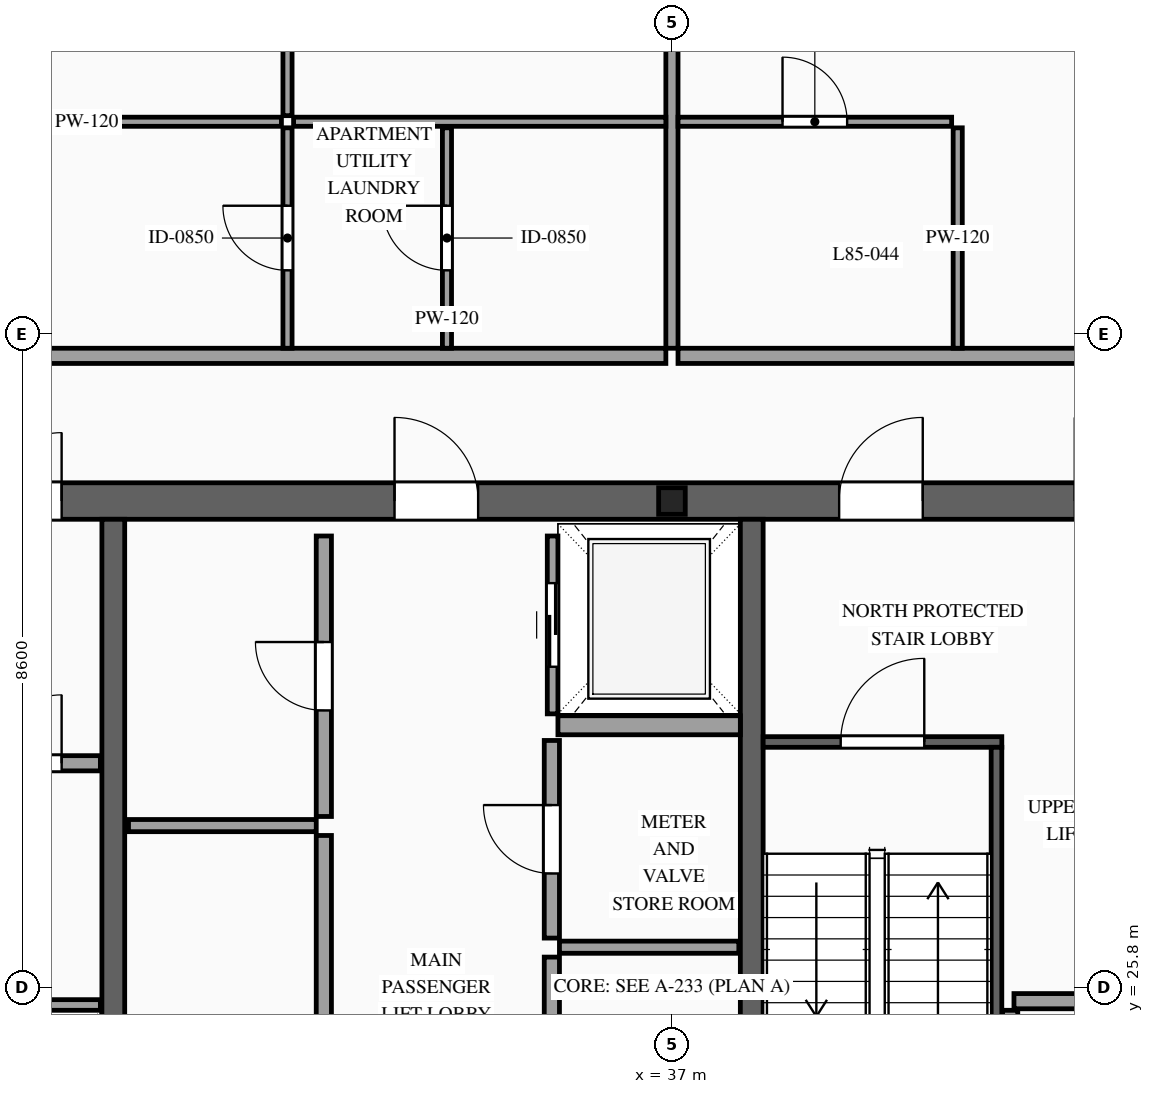
"""IFC4 building model, lengths in metres.
Left out: names, types, materials, properties, quantities, classifications, styles, units other than length and angle.
Written with IfcOpenShell. Run it as: python <this file> out.ifc"""

import sys

from ifc_helpers import new_model, si_unit, direction, frame, frame_2d, origin, origin_2d, place, context, subcontext, project, spatial, rectangle, i_section, extrude, source, transform, mapped, element, fill, save


model = new_model("IFC4")
c1 = context("Model", 3, precision=1e-05, world=origin(), true_north=direction((0.0, 1.0)))
c2 = subcontext(c1, "Body", "Model", "MODEL_VIEW")
j1 = project(units=[si_unit("LENGTHUNIT", "METRE"), si_unit("PLANEANGLEUNIT", "RADIAN")], contexts=[c1])
p1 = place(None, origin())
s1 = spatial("IfcSite", under=j1, at=p1, CompositionType="ELEMENT")
p2 = place(p1, origin())
s2 = spatial("IfcBuilding", under=s1, at=p2, CompositionType="ELEMENT")
p3 = place(p2, frame((0.0, 0.0, 318.2)))
s3 = spatial("IfcBuildingStorey", under=s2, at=p3, CompositionType="ELEMENT", Elevation=318.2)
p4 = place(p3, frame((23.56, 32.2, 0.0), z_axis=(0.0, 0.0, 1.0), x_axis=(1.0, 0.0, 0.0)))
e1 = element("IfcWall", 1, at=p4, inside=s3, PredefinedType="SHEAR", context=c2, shape_type="SweptSolid", body=[
    extrude(rectangle(XDim=26.88, YDim=0.48, at=frame_2d((13.44, 0.0))), origin(), (0.0, 0.0, 1.0), 3.5),
])
p5 = place(p4, frame((4.51, 0.0, 0.0)))
e2 = element("IfcOpeningElement", 2, at=p5, cuts=e1, PredefinedType="OPENING", context=c2, shape_type="SweptSolid", body=[
    extrude(rectangle(XDim=0.9, YDim=2.15, at=frame_2d((0.45, 1.075))), frame((0.0, 0.255, 0.0), z_axis=(0.0, -1.0, 0.0), x_axis=(1.0, 0.0, 0.0)), (0.0, 0.0, 1.0), 0.51),
])
p6 = place(p4, frame((9.79, 0.0, 0.0)))
e3 = element("IfcOpeningElement", 3, at=p6, cuts=e1, PredefinedType="OPENING", context=c2, shape_type="SweptSolid", body=[
    extrude(rectangle(XDim=1.1, YDim=2.2, at=frame_2d((0.55, 1.1))), frame((0.0, 0.255, 0.0), z_axis=(0.0, -1.0, 0.0), x_axis=(1.0, 0.0, 0.0)), (0.0, 0.0, 1.0), 0.51),
])
p7 = place(p4, frame((15.64, 0.0, 0.0)))
e4 = element("IfcOpeningElement", 4, at=p7, cuts=e1, PredefinedType="OPENING", context=c2, shape_type="SweptSolid", body=[
    extrude(rectangle(XDim=1.1, YDim=2.2, at=frame_2d((0.55, 1.1))), frame((0.0, 0.255, 0.0), z_axis=(0.0, -1.0, 0.0), x_axis=(1.0, 0.0, 0.0)), (0.0, 0.0, 1.0), 0.51),
])
p8 = place(p4, frame((18.74, 0.0, 0.0)))
e5 = element("IfcOpeningElement", 5, at=p8, cuts=e1, PredefinedType="OPENING", context=c2, shape_type="SweptSolid", body=[
    extrude(rectangle(XDim=1.1, YDim=2.2, at=frame_2d((0.55, 1.1))), frame((0.0, 0.255, 0.0), z_axis=(0.0, -1.0, 0.0), x_axis=(1.0, 0.0, 0.0)), (0.0, 0.0, 1.0), 0.51),
])
m1 = source(origin(), c2, "Body", "SweptSolid", [
    extrude(rectangle(XDim=12.32, YDim=0.3, at=frame_2d((6.16, 0.0))), origin(), (0.0, 0.0, 1.0), 3.5),
])
for number, where, z_axis, x_axis in (
    (6, (29.65, 19.64, 0.0), (0.0, 0.0, 1.0), (0.0, 1.0, 0.0)),
    (7, (38.05, 19.64, 0.0), (0.0, 0.0, 1.0), (0.0, 1.0, 0.0)),
):
    element("IfcWall", number, at=place(p3, frame(where, z_axis=z_axis, x_axis=x_axis)), inside=s3, PredefinedType="SOLIDWALL", context=c2, shape_type="MappedRepresentation", body=[
        mapped(m1, transform((0.0, 0.0, 0.0), scale=1.0)),
    ])
m2 = source(origin(), c2, "Body", "SweptSolid", [
    extrude(i_section(OverallWidth=0.35, OverallDepth=0.35, WebThickness=0.012, FlangeThickness=0.019, at=origin_2d()), origin(), (0.0, 0.0, 1.0), 3.5),
])
p9 = place(p3, frame((37.0, 32.2, 0.0), z_axis=(0.0, 0.0, 1.0), x_axis=(1.0, 0.0, 0.0)))
e8 = element("IfcColumn", 8, at=p9, inside=s3, PredefinedType="COLUMN", context=c2, shape_type="MappedRepresentation", body=[
    mapped(m2, transform((0.0, 0.0, 0.0), scale=1.0)),
])
m3 = source(origin(), c2, "Body", "SweptSolid", [
    extrude(rectangle(XDim=1.92, YDim=0.14, at=frame_2d((0.96, 0.0))), origin(), (0.0, 0.0, 1.0), 3.28),
])
p10 = place(p3, frame((27.56, 25.57, 0.0), z_axis=(0.0, 0.0, 1.0), x_axis=(1.0, 0.0, 0.0)))
e9 = element("IfcWall", 9, at=p10, inside=s3, PredefinedType="SOLIDWALL", context=c2, shape_type="MappedRepresentation", body=[
    mapped(m3, transform((0.0, 0.0, 0.0), scale=1.0)),
])
p11 = place(p3, frame((35.43, 29.4, 0.0), z_axis=(0.0, 0.0, 1.0), x_axis=(0.0, 1.0, 0.0)))
e10 = element("IfcWall", 10, at=p11, inside=s3, PredefinedType="SOLIDWALL", context=c2, shape_type="SweptSolid", body=[
    extrude(rectangle(XDim=2.34, YDim=0.14, at=frame_2d((1.17, 0.0))), origin(), (0.0, 0.0, 1.0), 3.28),
])
p12 = place(p11, frame((0.62, 0.0, 0.0)))
e11 = element("IfcOpeningElement", 11, at=p12, cuts=e10, PredefinedType="OPENING", context=c2, shape_type="SweptSolid", body=[
    extrude(rectangle(XDim=1.1, YDim=2.2, at=frame_2d((0.55, 1.1))), frame((0.0, 0.085, 0.0), z_axis=(0.0, -1.0, 0.0), x_axis=(1.0, 0.0, 0.0)), (0.0, 0.0, 1.0), 0.17),
])
m4 = source(origin(), c2, "Body", "SweptSolid", [
    extrude(rectangle(XDim=2.4, YDim=0.25, at=frame_2d((1.2, 0.0))), origin(), (0.0, 0.0, 1.0), 3.28),
])
p13 = place(p3, frame((35.5, 29.25, 0.0), z_axis=(0.0, 0.0, 1.0), x_axis=(1.0, 0.0, 0.0)))
e12 = element("IfcWall", 12, at=p13, inside=s3, PredefinedType="SOLIDWALL", context=c2, shape_type="MappedRepresentation", body=[
    mapped(m4, transform((0.0, 0.0, 0.0), scale=1.0)),
])
p14 = place(p3, frame((38.2, 29.03, 0.0), z_axis=(0.0, 0.0, 1.0), x_axis=(1.0, 0.0, 0.0)))
e13 = element("IfcWall", 13, at=p14, inside=s3, PredefinedType="SOLIDWALL", context=c2, shape_type="SweptSolid", body=[
    extrude(rectangle(XDim=3.14, YDim=0.14, at=frame_2d((1.57, 0.0))), origin(), (0.0, 0.0, 1.0), 3.28),
])
p15 = place(p14, frame((1.02, 0.0, 0.0)))
e14 = element("IfcOpeningElement", 14, at=p15, cuts=e13, PredefinedType="OPENING", context=c2, shape_type="SweptSolid", body=[
    extrude(rectangle(XDim=1.1, YDim=2.2, at=frame_2d((0.55, 1.1))), frame((0.0, 0.085, 0.0), z_axis=(0.0, -1.0, 0.0), x_axis=(1.0, 0.0, 0.0)), (0.0, 0.0, 1.0), 0.17),
])
m5 = source(origin(), c2, "Body", "SweptSolid", [
    extrude(rectangle(XDim=8.94, YDim=0.14, at=frame_2d((4.47, 0.0))), origin(), (0.0, 0.0, 1.0), 3.28),
])
p16 = place(p3, frame((41.27, 20.02, 0.0), z_axis=(0.0, 0.0, 1.0), x_axis=(0.0, 1.0, 0.0)))
e15 = element("IfcWall", 15, at=p16, inside=s3, PredefinedType="SOLIDWALL", context=c2, shape_type="MappedRepresentation", body=[
    mapped(m5, transform((0.0, 0.0, 0.0), scale=1.0)),
])
p17 = place(p3, frame((27.56, 28.75, 0.0), z_axis=(0.0, 0.0, 1.0), x_axis=(1.0, 0.0, 0.0)))
e16 = element("IfcWall", 16, at=p17, inside=s3, PredefinedType="PARTITIONING", context=c2, shape_type="SweptSolid", body=[
    extrude(rectangle(XDim=1.92, YDim=0.2, at=frame_2d((0.96, 0.0))), origin(), (0.0, 0.0, 1.0), 3.28),
])
p18 = place(p17, frame((0.51, 0.0, 0.0)))
e17 = element("IfcOpeningElement", 17, at=p18, cuts=e16, PredefinedType="OPENING", context=c2, shape_type="SweptSolid", body=[
    extrude(rectangle(XDim=0.9, YDim=2.15, at=frame_2d((0.45, 1.075))), frame((0.0, 0.115, 0.0), z_axis=(0.0, -1.0, 0.0), x_axis=(1.0, 0.0, 0.0)), (0.0, 0.0, 1.0), 0.23),
])
p19 = place(p3, frame((32.42, 19.86, 0.0), z_axis=(0.0, 0.0, 1.0), x_axis=(0.0, 1.0, 0.0)))
e18 = element("IfcWall", 18, at=p19, inside=s3, PredefinedType="PARTITIONING", context=c2, shape_type="SweptSolid", body=[
    extrude(rectangle(XDim=7.94, YDim=0.2, at=frame_2d((3.97, 0.0))), origin(), (0.0, 0.0, 1.0), 3.28),
])
p20 = place(p19, frame((3.52, 0.0, 0.0)))
e19 = element("IfcOpeningElement", 19, at=p20, cuts=e18, PredefinedType="OPENING", context=c2, shape_type="SweptSolid", body=[
    extrude(rectangle(XDim=0.9, YDim=2.15, at=frame_2d((0.45, 1.075))), frame((0.0, 0.115, 0.0), z_axis=(0.0, -1.0, 0.0), x_axis=(1.0, 0.0, 0.0)), (0.0, 0.0, 1.0), 0.23),
])
p21 = place(p3, frame((32.42, 28.05, 0.0), z_axis=(0.0, 0.0, 1.0), x_axis=(0.0, 1.0, 0.0)))
e20 = element("IfcWall", 20, at=p21, inside=s3, PredefinedType="PARTITIONING", context=c2, shape_type="SweptSolid", body=[
    extrude(rectangle(XDim=3.69, YDim=0.2, at=frame_2d((1.845, 0.0))), origin(), (0.0, 0.0, 1.0), 3.28),
])
p22 = place(p21, frame((1.395, 0.0, 0.0)))
e21 = element("IfcOpeningElement", 21, at=p22, cuts=e20, PredefinedType="OPENING", context=c2, shape_type="SweptSolid", body=[
    extrude(rectangle(XDim=0.9, YDim=2.15, at=frame_2d((0.45, 1.075))), frame((0.0, 0.115, 0.0), z_axis=(0.0, -1.0, 0.0), x_axis=(1.0, 0.0, 0.0)), (0.0, 0.0, 1.0), 0.23),
])
m6 = source(origin(), c2, "Body", "SweptSolid", [
    extrude(rectangle(XDim=2.47, YDim=0.16, at=frame_2d((1.235, 0.0))), origin(), (0.0, 0.0, 1.0), 3.28),
])
p23 = place(p3, frame((29.85, 27.93, 0.0), z_axis=(0.0, 0.0, 1.0), x_axis=(1.0, 0.0, 0.0)))
e22 = element("IfcWall", 22, at=p23, inside=s3, PredefinedType="PARTITIONING", context=c2, shape_type="MappedRepresentation", body=[
    mapped(m6, transform((0.0, 0.0, 0.0), scale=1.0)),
])
p24 = place(p3, frame((35.42, 19.86, 0.0), z_axis=(0.0, 0.0, 1.0), x_axis=(0.0, 1.0, 0.0)))
e23 = element("IfcWall", 23, at=p24, inside=s3, PredefinedType="PARTITIONING", context=c2, shape_type="SweptSolid", body=[
    extrude(rectangle(XDim=6.34, YDim=0.2, at=frame_2d((3.17, 0.0))), origin(), (0.0, 0.0, 1.0), 3.28),
])
p25 = place(p24, frame((2.72, 0.0, 0.0)))
e24 = element("IfcOpeningElement", 24, at=p25, cuts=e23, PredefinedType="OPENING", context=c2, shape_type="SweptSolid", body=[
    extrude(rectangle(XDim=0.9, YDim=2.15, at=frame_2d((0.45, 1.075))), frame((0.0, 0.115, 0.0), z_axis=(0.0, -1.0, 0.0), x_axis=(1.0, 0.0, 0.0)), (0.0, 0.0, 1.0), 0.23),
])
p26 = place(p3, frame((35.42, 26.45, 0.0), z_axis=(0.0, 0.0, 1.0), x_axis=(0.0, 1.0, 0.0)))
e25 = element("IfcWall", 25, at=p26, inside=s3, PredefinedType="PARTITIONING", context=c2, shape_type="SweptSolid", body=[
    extrude(rectangle(XDim=2.6, YDim=0.2, at=frame_2d((1.3, 0.0))), origin(), (0.0, 0.0, 1.0), 3.28),
])
p27 = place(p26, frame((0.85, 0.0, 0.0)))
e26 = element("IfcOpeningElement", 26, at=p27, cuts=e25, PredefinedType="OPENING", context=c2, shape_type="SweptSolid", body=[
    extrude(rectangle(XDim=0.9, YDim=2.15, at=frame_2d((0.45, 1.075))), frame((0.0, 0.115, 0.0), z_axis=(0.0, -1.0, 0.0), x_axis=(1.0, 0.0, 0.0)), (0.0, 0.0, 1.0), 0.23),
])
m7 = source(origin(), c2, "Body", "SweptSolid", [
    extrude(rectangle(XDim=2.36, YDim=0.16, at=frame_2d((1.18, 0.0))), origin(), (0.0, 0.0, 1.0), 3.28),
])
p28 = place(p3, frame((35.52, 26.33, 0.0), z_axis=(0.0, 0.0, 1.0), x_axis=(1.0, 0.0, 0.0)))
e27 = element("IfcWall", 27, at=p28, inside=s3, PredefinedType="PARTITIONING", context=c2, shape_type="MappedRepresentation", body=[
    mapped(m7, transform((0.0, 0.0, 0.0), scale=1.0)),
])
m8 = source(origin(), c2, "Body", "SweptSolid", [
    extrude(rectangle(XDim=6.06, YDim=0.2, at=frame_2d((3.03, 0.0))), origin(), (0.0, 0.0, 1.0), 3.28),
])
p29 = place(p3, frame((41.45, 19.44, 0.0), z_axis=(0.0, 0.0, 1.0), x_axis=(0.0, 1.0, 0.0)))
e28 = element("IfcWall", 28, at=p29, inside=s3, PredefinedType="PARTITIONING", context=c2, shape_type="MappedRepresentation", body=[
    mapped(m8, transform((0.0, 0.0, 0.0), scale=1.0)),
])
m9 = source(origin(), c2, "Body", "SweptSolid", [
    extrude(rectangle(XDim=1.35, YDim=0.2, at=frame_2d((0.675, 0.0))), origin(), (0.0, 0.0, 1.0), 3.28),
])
p30 = place(p3, frame((41.5, 25.62, 0.0), z_axis=(0.0, 0.0, 1.0), x_axis=(1.0, 0.0, 0.0)))
e29 = element("IfcWall", 29, at=p30, inside=s3, PredefinedType="PARTITIONING", context=c2, shape_type="MappedRepresentation", body=[
    mapped(m9, transform((0.0, 0.0, 0.0), scale=1.0)),
])
p31 = place(p3, frame((20.94, 34.11, 0.0), z_axis=(0.0, 0.0, 1.0), x_axis=(1.0, 0.0, 0.0)))
e30 = element("IfcWall", 30, at=p31, inside=s3, PredefinedType="PARTITIONING", context=c2, shape_type="SweptSolid", body=[
    extrude(rectangle(XDim=15.98, YDim=0.2, at=frame_2d((7.99, 0.0))), origin(), (0.0, 0.0, 1.0), 3.28),
])
p32 = place(p31, frame((6.841, 0.0, 0.0)))
e31 = element("IfcOpeningElement", 31, at=p32, cuts=e30, PredefinedType="OPENING", context=c2, shape_type="SweptSolid", body=[
    extrude(rectangle(XDim=1.0, YDim=2.2, at=frame_2d((0.5, 1.1))), frame((0.0, 0.115, 0.0), z_axis=(0.0, -1.0, 0.0), x_axis=(1.0, 0.0, 0.0)), (0.0, 0.0, 1.0), 0.23),
])
m10 = source(origin(), c2, "Body", "SweptSolid", [
    extrude(rectangle(XDim=10.54, YDim=0.16, at=frame_2d((5.27, 0.0))), origin(), (0.0, 0.0, 1.0), 2.787),
])
p33 = place(p3, frame((37.0, 34.21, 0.0), z_axis=(0.0, 0.0, 1.0), x_axis=(0.0, 1.0, 0.0)))
e32 = element("IfcWall", 32, at=p33, inside=s3, PredefinedType="PARTITIONING", context=c2, shape_type="MappedRepresentation", body=[
    mapped(m10, transform((0.0, 0.0, 0.0), scale=1.0)),
])
p34 = place(p3, frame((34.04, 34.21, 0.0), z_axis=(0.0, 0.0, 1.0), x_axis=(0.0, 1.0, 0.0)))
e33 = element("IfcWall", 33, at=p34, inside=s3, PredefinedType="PARTITIONING", context=c2, shape_type="SweptSolid", body=[
    extrude(rectangle(XDim=2.9, YDim=0.12, at=frame_2d((1.45, 0.0))), origin(), (0.0, 0.0, 1.0), 3.28),
])
p35 = place(p34, frame((1.025, 0.0, 0.0)))
e34 = element("IfcOpeningElement", 34, at=p35, cuts=e33, PredefinedType="OPENING", context=c2, shape_type="SweptSolid", body=[
    extrude(rectangle(XDim=0.85, YDim=2.1, at=frame_2d((0.425, 1.05))), frame((0.0, 0.075, 0.0), z_axis=(0.0, -1.0, 0.0), x_axis=(1.0, 0.0, 0.0)), (0.0, 0.0, 1.0), 0.15),
])
m11 = source(origin(), c2, "Body", "SweptSolid", [
    extrude(rectangle(XDim=4.898, YDim=0.12, at=frame_2d((2.449, 0.0))), origin(), (0.0, 0.0, 1.0), 3.28),
])
p36 = place(p3, frame((32.022, 37.19, 0.0), z_axis=(0.0, 0.0, 1.0), x_axis=(1.0, 0.0, 0.0)))
e35 = element("IfcWall", 35, at=p36, inside=s3, PredefinedType="PARTITIONING", context=c2, shape_type="MappedRepresentation", body=[
    mapped(m11, transform((0.0, 0.0, 0.0), scale=1.0)),
])
p37 = place(p3, frame((31.942, 37.27, 0.0), z_axis=(0.0, 0.0, 1.0), x_axis=(0.0, 1.0, 0.0)))
e36 = element("IfcWall", 36, at=p37, inside=s3, PredefinedType="PARTITIONING", context=c2, shape_type="SweptSolid", body=[
    extrude(rectangle(XDim=7.48, YDim=0.12, at=frame_2d((3.74, 0.0))), origin(), (0.0, 0.0, 1.0), 3.28),
])
p38 = place(p37, frame((3.29, 0.0, 0.0)))
e37 = element("IfcOpeningElement", 37, at=p38, cuts=e36, PredefinedType="OPENING", context=c2, shape_type="SweptSolid", body=[
    extrude(rectangle(XDim=0.9, YDim=2.15, at=frame_2d((0.45, 1.075))), frame((0.0, 0.075, 0.0), z_axis=(0.0, -1.0, 0.0), x_axis=(1.0, 0.0, 0.0)), (0.0, 0.0, 1.0), 0.15),
])
p39 = place(p3, frame((31.942, 34.21, 0.0), z_axis=(0.0, 0.0, 1.0), x_axis=(0.0, 1.0, 0.0)))
e38 = element("IfcWall", 38, at=p39, inside=s3, PredefinedType="PARTITIONING", context=c2, shape_type="SweptSolid", body=[
    extrude(rectangle(XDim=2.9, YDim=0.12, at=frame_2d((1.45, 0.0))), origin(), (0.0, 0.0, 1.0), 3.28),
])
p40 = place(p39, frame((1.025, 0.0, 0.0)))
e39 = element("IfcOpeningElement", 39, at=p40, cuts=e38, PredefinedType="OPENING", context=c2, shape_type="SweptSolid", body=[
    extrude(rectangle(XDim=0.85, YDim=2.1, at=frame_2d((0.425, 1.05))), frame((0.0, 0.075, 0.0), z_axis=(0.0, -1.0, 0.0), x_axis=(1.0, 0.0, 0.0)), (0.0, 0.0, 1.0), 0.15),
])
m12 = source(origin(), c2, "Body", "SweptSolid", [
    extrude(rectangle(XDim=5.122, YDim=0.12, at=frame_2d((2.561, 0.0))), origin(), (0.0, 0.0, 1.0), 3.28),
])
p41 = place(p3, frame((26.74, 37.19, 0.0), z_axis=(0.0, 0.0, 1.0), x_axis=(1.0, 0.0, 0.0)))
e40 = element("IfcWall", 40, at=p41, inside=s3, PredefinedType="PARTITIONING", context=c2, shape_type="MappedRepresentation", body=[
    mapped(m12, transform((0.0, 0.0, 0.0), scale=1.0)),
])
p42 = place(p3, frame((37.08, 34.11, 0.0), z_axis=(0.0, 0.0, 1.0), x_axis=(1.0, 0.0, 0.0)))
e41 = element("IfcWall", 41, at=p42, inside=s3, PredefinedType="PARTITIONING", context=c2, shape_type="SweptSolid", body=[
    extrude(rectangle(XDim=15.98, YDim=0.2, at=frame_2d((7.99, 0.0))), origin(), (0.0, 0.0, 1.0), 3.28),
])
p43 = place(p42, frame((5.965, 0.0, 0.0)))
e42 = element("IfcOpeningElement", 42, at=p43, cuts=e41, PredefinedType="OPENING", context=c2, shape_type="SweptSolid", body=[
    extrude(rectangle(XDim=1.0, YDim=2.2, at=frame_2d((0.5, 1.1))), frame((0.0, 0.115, 0.0), z_axis=(0.0, -1.0, 0.0), x_axis=(1.0, 0.0, 0.0)), (0.0, 0.0, 1.0), 0.23),
])
p44 = place(p3, frame((37.08, 37.19, 0.0), z_axis=(0.0, 0.0, 1.0), x_axis=(1.0, 0.0, 0.0)))
e43 = element("IfcWall", 43, at=p44, inside=s3, PredefinedType="PARTITIONING", context=c2, shape_type="SweptSolid", body=[
    extrude(rectangle(XDim=3.6, YDim=0.12, at=frame_2d((1.8, 0.0))), origin(), (0.0, 0.0, 1.0), 3.28),
])
p45 = place(p44, frame((1.375, 0.0, 0.0)))
e44 = element("IfcOpeningElement", 44, at=p45, cuts=e43, PredefinedType="OPENING", context=c2, shape_type="SweptSolid", body=[
    extrude(rectangle(XDim=0.85, YDim=2.1, at=frame_2d((0.425, 1.05))), frame((0.0, 0.075, 0.0), z_axis=(0.0, -1.0, 0.0), x_axis=(1.0, 0.0, 0.0)), (0.0, 0.0, 1.0), 0.15),
])
m13 = source(origin(), c2, "Body", "SweptSolid", [
    extrude(rectangle(XDim=2.9, YDim=0.12, at=frame_2d((1.45, 0.0))), origin(), (0.0, 0.0, 1.0), 3.28),
])
p46 = place(p3, frame((40.76, 34.21, 0.0), z_axis=(0.0, 0.0, 1.0), x_axis=(0.0, 1.0, 0.0)))
e45 = element("IfcWall", 45, at=p46, inside=s3, PredefinedType="PARTITIONING", context=c2, shape_type="MappedRepresentation", body=[
    mapped(m13, transform((0.0, 0.0, 0.0), scale=1.0)),
])
m14 = source(origin(), c2, "Body", "SweptSolid", [
    extrude(rectangle(XDim=1.1, YDim=2.2, at=frame_2d((0.55, 1.1))), frame((0.0, 0.025, 0.0), z_axis=(0.0, -1.0, 0.0), x_axis=(1.0, 0.0, 0.0)), (0.0, 0.0, 1.0), 0.05),
])
p47 = place(p12, origin())
e46 = element("IfcDoor", 46, at=p47, inside=s3, OperationType="SLIDING_TO_RIGHT", PredefinedType="DOOR", context=c2, shape_type="MappedRepresentation", body=[
    mapped(m14, transform((0.0, 0.0, 0.0), scale=1.0)),
])
fill(e11, e46)
m15 = source(origin(), c2, "Body", "SweptSolid", [
    extrude(rectangle(XDim=1.1, YDim=2.2, at=frame_2d((0.55, 1.1))), frame((0.0, 0.025, 0.0), z_axis=(0.0, -1.0, 0.0), x_axis=(1.0, 0.0, 0.0)), (0.0, 0.0, 1.0), 0.05),
])
p48 = place(p15, origin())
e47 = element("IfcDoor", 47, at=p48, inside=s3, OperationType="SINGLE_SWING_RIGHT", PredefinedType="DOOR", context=c2, shape_type="MappedRepresentation", body=[
    mapped(m15, transform((0.0, 0.0, 0.0), scale=1.0)),
])
fill(e14, e47)
m16 = source(origin(), c2, "Body", "SweptSolid", [
    extrude(rectangle(XDim=0.9, YDim=2.15, at=frame_2d((0.45, 1.075))), frame((0.0, 0.025, 0.0), z_axis=(0.0, -1.0, 0.0), x_axis=(1.0, 0.0, 0.0)), (0.0, 0.0, 1.0), 0.05),
])
p49 = place(p5, origin())
e48 = element("IfcDoor", 48, at=p49, inside=s3, OperationType="SINGLE_SWING_RIGHT", PredefinedType="DOOR", context=c2, shape_type="MappedRepresentation", body=[
    mapped(m16, transform((0.0, 0.0, 0.0), scale=1.0)),
])
fill(e2, e48)
p50 = place(p6, origin())
e49 = element("IfcDoor", 49, at=p50, inside=s3, OperationType="SINGLE_SWING_LEFT", PredefinedType="DOOR", context=c2, shape_type="MappedRepresentation", body=[
    mapped(m15, transform((0.0, 0.0, 0.0), scale=1.0)),
])
fill(e3, e49)
p51 = place(p7, origin())
e50 = element("IfcDoor", 50, at=p51, inside=s3, OperationType="SINGLE_SWING_RIGHT", PredefinedType="DOOR", context=c2, shape_type="MappedRepresentation", body=[
    mapped(m15, transform((0.0, 0.0, 0.0), scale=1.0)),
])
fill(e4, e50)
p52 = place(p18, origin())
e51 = element("IfcDoor", 51, at=p52, inside=s3, OperationType="SINGLE_SWING_RIGHT", PredefinedType="DOOR", context=c2, shape_type="MappedRepresentation", body=[
    mapped(m16, transform((0.0, 0.0, 0.0), scale=1.0)),
])
fill(e17, e51)
p53 = place(p22, origin())
e52 = element("IfcDoor", 52, at=p53, inside=s3, OperationType="SINGLE_SWING_RIGHT", PredefinedType="DOOR", context=c2, shape_type="MappedRepresentation", body=[
    mapped(m16, transform((0.0, 0.0, 0.0), scale=1.0)),
])
fill(e21, e52)
p54 = place(p27, origin())
e53 = element("IfcDoor", 53, at=p54, inside=s3, OperationType="SINGLE_SWING_RIGHT", PredefinedType="DOOR", context=c2, shape_type="MappedRepresentation", body=[
    mapped(m16, transform((0.0, 0.0, 0.0), scale=1.0)),
])
fill(e26, e53)
m17 = source(origin(), c2, "Body", "SweptSolid", [
    extrude(rectangle(XDim=0.85, YDim=2.1, at=frame_2d((0.425, 1.05))), frame((0.0, 0.025, 0.0), z_axis=(0.0, -1.0, 0.0), x_axis=(1.0, 0.0, 0.0)), (0.0, 0.0, 1.0), 0.05),
])
p55 = place(p35, origin())
e54 = element("IfcDoor", 54, at=p55, inside=s3, OperationType="SINGLE_SWING_RIGHT", PredefinedType="DOOR", context=c2, shape_type="MappedRepresentation", body=[
    mapped(m17, transform((0.0, 0.0, 0.0), scale=1.0)),
])
fill(e34, e54)
p56 = place(p40, origin())
e55 = element("IfcDoor", 55, at=p56, inside=s3, OperationType="SINGLE_SWING_RIGHT", PredefinedType="DOOR", context=c2, shape_type="MappedRepresentation", body=[
    mapped(m17, transform((0.0, 0.0, 0.0), scale=1.0)),
])
fill(e39, e55)
p57 = place(p45, origin())
e56 = element("IfcDoor", 56, at=p57, inside=s3, OperationType="SINGLE_SWING_LEFT", PredefinedType="DOOR", context=c2, shape_type="MappedRepresentation", body=[
    mapped(m17, transform((0.0, 0.0, 0.0), scale=1.0)),
])
fill(e44, e56)
save(model, sys.argv[1])
